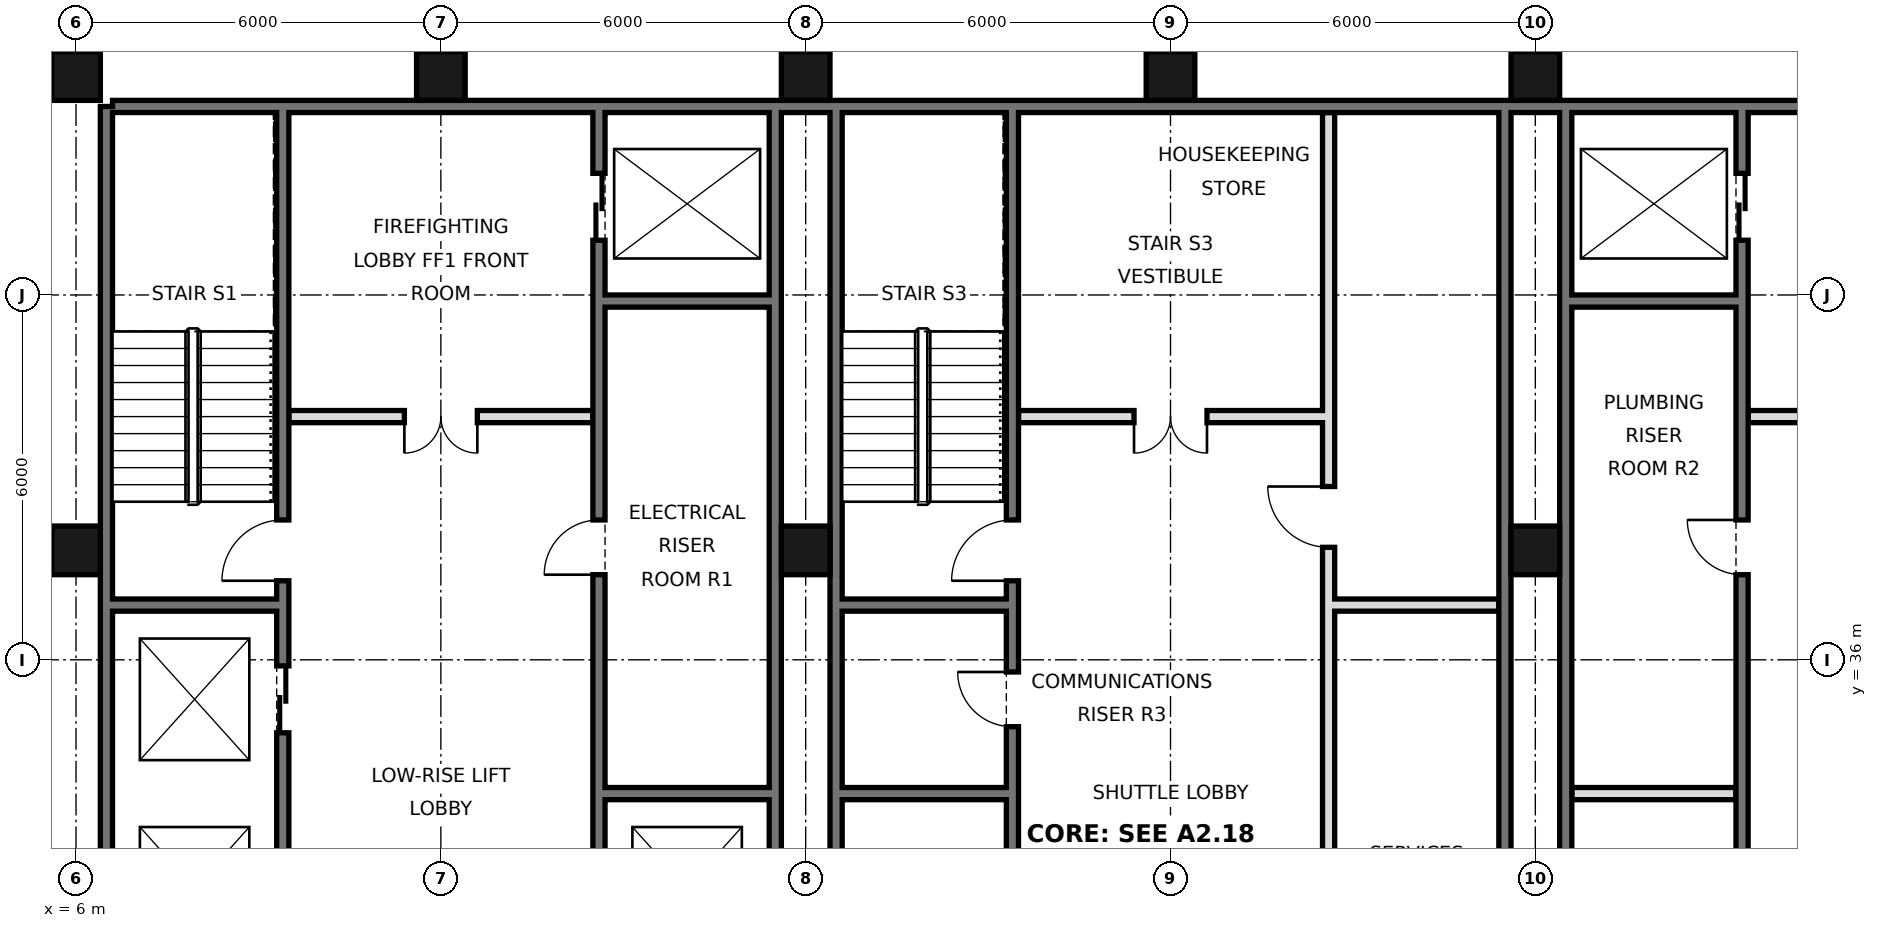
"""IFC4 building model, lengths in metres.
Left out: names, types, materials, properties, quantities, classifications, styles, units other than length and angle.
Written with IfcOpenShell. Run it as: python <this file> out.ifc"""

import sys

from ifc_helpers import new_model, si_unit, direction, frame, frame_2d, origin, origin_2d, place, context, subcontext, project, spatial, rectangle, hollow_rectangle, extrude, element, fill, save


model = new_model("IFC4")
c1 = context("Model", 3, precision=1e-05, world=origin(), true_north=direction((0.0, 1.0)))
c2 = subcontext(c1, "Body", "Model", "MODEL_VIEW")
j1 = project(units=[si_unit("LENGTHUNIT", "METRE"), si_unit("PLANEANGLEUNIT", "RADIAN")], contexts=[c1])
p1 = place(None, origin())
s1 = spatial("IfcSite", under=j1, at=p1, CompositionType="ELEMENT")
p2 = place(p1, origin())
s2 = spatial("IfcBuilding", under=s1, at=p2, CompositionType="ELEMENT")
p3 = place(p2, frame((0.0, 0.0, 71.4)))
s3 = spatial("IfcBuildingStorey", under=s2, at=p3, CompositionType="ELEMENT", Elevation=71.4)
for number, where, z_axis, x_axis in (
    (1, (6.0, 37.8, 0.0), (0.0, 0.0, 1.0), (1.0, 0.0, 0.0)),
    (2, (6.0, 45.6, 0.0), (0.0, 0.0, 1.0), (1.0, 0.0, 0.0)),
    (3, (12.0, 45.6, 0.0), (0.0, 0.0, 1.0), (1.0, 0.0, 0.0)),
    (4, (18.0, 37.8, 0.0), (0.0, 0.0, 1.0), (1.0, 0.0, 0.0)),
    (5, (18.0, 45.6, 0.0), (0.0, 0.0, 1.0), (1.0, 0.0, 0.0)),
    (6, (24.0, 45.6, 0.0), (0.0, 0.0, 1.0), (1.0, 0.0, 0.0)),
    (7, (30.0, 37.8, 0.0), (0.0, 0.0, 1.0), (1.0, 0.0, 0.0)),
    (8, (30.0, 45.6, 0.0), (0.0, 0.0, 1.0), (1.0, 0.0, 0.0)),
):
    element("IfcColumn", number, at=place(p3, frame(where, z_axis=z_axis, x_axis=x_axis)), inside=s3, PredefinedType="COLUMN", context=c2, shape_type="SweptSolid", body=[
        extrude(hollow_rectangle(XDim=0.8, YDim=0.8, WallThickness=0.06, at=origin_2d()), origin(), (0.0, 0.0, 1.0), 3.6),
    ])
p4 = place(p3, frame((6.5, 21.6, 0.0), z_axis=(0.0, 0.0, 1.0), x_axis=(0.0, 1.0, 0.0)))
e9 = element("IfcWall", 9, at=p4, inside=s3, PredefinedType="SOLIDWALL", context=c2, shape_type="SweptSolid", body=[
    extrude(rectangle(XDim=23.5, YDim=0.2, at=frame_2d((11.75, 0.0))), origin(), (0.0, 0.0, 1.0), 3.42),
])
p5 = place(p3, frame((6.6, 45.1, 0.0), z_axis=(0.0, 0.0, 1.0), x_axis=(1.0, 0.0, 0.0)))
e10 = element("IfcWall", 10, at=p5, inside=s3, PredefinedType="SOLIDWALL", context=c2, shape_type="SweptSolid", body=[
    extrude(rectangle(XDim=34.8, YDim=0.2, at=frame_2d((17.4, 0.0))), origin(), (0.0, 0.0, 1.0), 3.42),
])
for number, where, z_axis, x_axis in (
    (11, (17.5, 27.6, 0.0), (0.0, 0.0, 1.0), (0.0, 1.0, 0.0)),
    (12, (18.5, 27.6, 0.0), (0.0, 0.0, 1.0), (0.0, 1.0, 0.0)),
    (13, (29.5, 27.6, 0.0), (0.0, 0.0, 1.0), (0.0, 1.0, 0.0)),
    (14, (30.5, 27.6, 0.0), (0.0, 0.0, 1.0), (0.0, 1.0, 0.0)),
):
    element("IfcWall", number, at=place(p3, frame(where, z_axis=z_axis, x_axis=x_axis)), inside=s3, PredefinedType="SOLIDWALL", context=c2, shape_type="SweptSolid", body=[
        extrude(rectangle(XDim=17.5, YDim=0.2, at=frame_2d((8.75, 0.0))), origin(), (0.0, 0.0, 1.0), 3.42),
    ])
p6 = place(p3, frame((14.6, 27.5, 0.0), z_axis=(0.0, 0.0, 1.0), x_axis=(0.0, 1.0, 0.0)))
e15 = element("IfcWall", 15, at=p6, inside=s3, PredefinedType="SOLIDWALL", context=c2, shape_type="SweptSolid", body=[
    extrude(rectangle(XDim=17.5, YDim=0.2, at=frame_2d((8.75, 0.0))), origin(), (0.0, 0.0, 1.0), 3.42),
])
p7 = place(p6, frame((1.1, 0.0, 0.0)))
e16 = element("IfcOpeningElement", 16, at=p7, cuts=e15, PredefinedType="OPENING", context=c2, shape_type="SweptSolid", body=[
    extrude(rectangle(XDim=1.1, YDim=2.1, at=frame_2d((0.55, 1.05))), frame((0.0, 0.11, 0.0), z_axis=(0.0, -1.0, 0.0), x_axis=(1.0, 0.0, 0.0)), (0.0, 0.0, 1.0), 0.22),
])
p8 = place(p6, frame((4.2, 0.0, 0.0)))
e17 = element("IfcOpeningElement", 17, at=p8, cuts=e15, PredefinedType="OPENING", context=c2, shape_type="SweptSolid", body=[
    extrude(rectangle(XDim=1.1, YDim=2.1, at=frame_2d((0.55, 1.05))), frame((0.0, 0.11, 0.0), z_axis=(0.0, -1.0, 0.0), x_axis=(1.0, 0.0, 0.0)), (0.0, 0.0, 1.0), 0.22),
])
p9 = place(p6, frame((15.4, 0.0, 0.0)))
e18 = element("IfcOpeningElement", 18, at=p9, cuts=e15, PredefinedType="OPENING", context=c2, shape_type="SweptSolid", body=[
    extrude(rectangle(XDim=1.1, YDim=2.1, at=frame_2d((0.55, 1.05))), frame((0.0, 0.11, 0.0), z_axis=(0.0, -1.0, 0.0), x_axis=(1.0, 0.0, 0.0)), (0.0, 0.0, 1.0), 0.22),
])
p10 = place(p6, frame((9.9, 0.0, 0.0)))
e19 = element("IfcOpeningElement", 19, at=p10, cuts=e15, PredefinedType="OPENING", context=c2, shape_type="SweptSolid", body=[
    extrude(rectangle(XDim=0.9, YDim=2.1, at=frame_2d((0.45, 1.05))), frame((0.0, 0.11, 0.0), z_axis=(0.0, -1.0, 0.0), x_axis=(1.0, 0.0, 0.0)), (0.0, 0.0, 1.0), 0.22),
])
p11 = place(p3, frame((21.4, 27.5, 0.0), z_axis=(0.0, 0.0, 1.0), x_axis=(0.0, 1.0, 0.0)))
e20 = element("IfcWall", 20, at=p11, inside=s3, PredefinedType="SOLIDWALL", context=c2, shape_type="SweptSolid", body=[
    extrude(rectangle(XDim=17.5, YDim=0.2, at=frame_2d((8.75, 0.0))), origin(), (0.0, 0.0, 1.0), 3.42),
])
p12 = place(p11, frame((9.8, 0.0, 0.0)))
e21 = element("IfcOpeningElement", 21, at=p12, cuts=e20, PredefinedType="OPENING", context=c2, shape_type="SweptSolid", body=[
    extrude(rectangle(XDim=1.0, YDim=2.1, at=frame_2d((0.5, 1.05))), frame((0.0, 0.11, 0.0), z_axis=(0.0, -1.0, 0.0), x_axis=(1.0, 0.0, 0.0)), (0.0, 0.0, 1.0), 0.22),
])
p13 = place(p11, frame((7.4, 0.0, 0.0)))
e22 = element("IfcOpeningElement", 22, at=p13, cuts=e20, PredefinedType="OPENING", context=c2, shape_type="SweptSolid", body=[
    extrude(rectangle(XDim=0.9, YDim=2.1, at=frame_2d((0.45, 1.05))), frame((0.0, 0.11, 0.0), z_axis=(0.0, -1.0, 0.0), x_axis=(1.0, 0.0, 0.0)), (0.0, 0.0, 1.0), 0.22),
])
p14 = place(p3, frame((26.6, 27.5, 0.0), z_axis=(0.0, 0.0, 1.0), x_axis=(0.0, 1.0, 0.0)))
e23 = element("IfcWall", 23, at=p14, inside=s3, PredefinedType="SOLIDWALL", context=c2, shape_type="SweptSolid", body=[
    extrude(rectangle(XDim=17.5, YDim=0.2, at=frame_2d((8.75, 0.0))), origin(), (0.0, 0.0, 1.0), 3.42),
])
p15 = place(p14, frame((4.3, 0.0, 0.0)))
e24 = element("IfcOpeningElement", 24, at=p15, cuts=e23, PredefinedType="OPENING", context=c2, shape_type="SweptSolid", body=[
    extrude(rectangle(XDim=0.9, YDim=2.1, at=frame_2d((0.45, 1.05))), frame((0.0, 0.11, 0.0), z_axis=(0.0, -1.0, 0.0), x_axis=(1.0, 0.0, 0.0)), (0.0, 0.0, 1.0), 0.22),
])
p16 = place(p14, frame((10.35, 0.0, 0.0)))
e25 = element("IfcOpeningElement", 25, at=p16, cuts=e23, PredefinedType="OPENING", context=c2, shape_type="SweptSolid", body=[
    extrude(rectangle(XDim=1.0, YDim=2.1, at=frame_2d((0.5, 1.05))), frame((0.0, 0.11, 0.0), z_axis=(0.0, -1.0, 0.0), x_axis=(1.0, 0.0, 0.0)), (0.0, 0.0, 1.0), 0.22),
])
p17 = place(p3, frame((33.4, 27.5, 0.0), z_axis=(0.0, 0.0, 1.0), x_axis=(0.0, 1.0, 0.0)))
e26 = element("IfcWall", 26, at=p17, inside=s3, PredefinedType="SOLIDWALL", context=c2, shape_type="SweptSolid", body=[
    extrude(rectangle(XDim=17.5, YDim=0.2, at=frame_2d((8.75, 0.0))), origin(), (0.0, 0.0, 1.0), 3.42),
])
p18 = place(p17, frame((15.4, 0.0, 0.0)))
e27 = element("IfcOpeningElement", 27, at=p18, cuts=e26, PredefinedType="OPENING", context=c2, shape_type="SweptSolid", body=[
    extrude(rectangle(XDim=1.1, YDim=2.1, at=frame_2d((0.55, 1.05))), frame((0.0, 0.11, 0.0), z_axis=(0.0, -1.0, 0.0), x_axis=(1.0, 0.0, 0.0)), (0.0, 0.0, 1.0), 0.22),
])
p19 = place(p17, frame((2.7, 0.0, 0.0)))
e28 = element("IfcOpeningElement", 28, at=p19, cuts=e26, PredefinedType="OPENING", context=c2, shape_type="SweptSolid", body=[
    extrude(rectangle(XDim=1.0, YDim=2.1, at=frame_2d((0.5, 1.05))), frame((0.0, 0.11, 0.0), z_axis=(0.0, -1.0, 0.0), x_axis=(1.0, 0.0, 0.0)), (0.0, 0.0, 1.0), 0.22),
])
p20 = place(p17, frame((9.9, 0.0, 0.0)))
e29 = element("IfcOpeningElement", 29, at=p20, cuts=e26, PredefinedType="OPENING", context=c2, shape_type="SweptSolid", body=[
    extrude(rectangle(XDim=0.9, YDim=2.1, at=frame_2d((0.45, 1.05))), frame((0.0, 0.11, 0.0), z_axis=(0.0, -1.0, 0.0), x_axis=(1.0, 0.0, 0.0)), (0.0, 0.0, 1.0), 0.22),
])
p21 = place(p3, frame((9.4, 21.6, 0.0), z_axis=(0.0, 0.0, 1.0), x_axis=(0.0, 1.0, 0.0)))
e30 = element("IfcWall", 30, at=p21, inside=s3, PredefinedType="SOLIDWALL", context=c2, shape_type="SweptSolid", body=[
    extrude(rectangle(XDim=23.4, YDim=0.2, at=frame_2d((11.7, 0.0))), origin(), (0.0, 0.0, 1.0), 3.42),
])
p22 = place(p21, frame((7.0, 0.0, 0.0)))
e31 = element("IfcOpeningElement", 31, at=p22, cuts=e30, PredefinedType="OPENING", context=c2, shape_type="SweptSolid", body=[
    extrude(rectangle(XDim=1.1, YDim=2.1, at=frame_2d((0.55, 1.05))), frame((0.0, 0.11, 0.0), z_axis=(0.0, -1.0, 0.0), x_axis=(1.0, 0.0, 0.0)), (0.0, 0.0, 1.0), 0.22),
])
p23 = place(p21, frame((10.1, 0.0, 0.0)))
e32 = element("IfcOpeningElement", 32, at=p23, cuts=e30, PredefinedType="OPENING", context=c2, shape_type="SweptSolid", body=[
    extrude(rectangle(XDim=1.1, YDim=2.1, at=frame_2d((0.55, 1.05))), frame((0.0, 0.11, 0.0), z_axis=(0.0, -1.0, 0.0), x_axis=(1.0, 0.0, 0.0)), (0.0, 0.0, 1.0), 0.22),
])
p24 = place(p21, frame((13.2, 0.0, 0.0)))
e33 = element("IfcOpeningElement", 33, at=p24, cuts=e30, PredefinedType="OPENING", context=c2, shape_type="SweptSolid", body=[
    extrude(rectangle(XDim=1.1, YDim=2.1, at=frame_2d((0.55, 1.05))), frame((0.0, 0.11, 0.0), z_axis=(0.0, -1.0, 0.0), x_axis=(1.0, 0.0, 0.0)), (0.0, 0.0, 1.0), 0.22),
])
p25 = place(p21, frame((15.7, 0.0, 0.0)))
e34 = element("IfcOpeningElement", 34, at=p25, cuts=e30, PredefinedType="OPENING", context=c2, shape_type="SweptSolid", body=[
    extrude(rectangle(XDim=1.0, YDim=2.1, at=frame_2d((0.5, 1.05))), frame((0.0, 0.11, 0.0), z_axis=(0.0, -1.0, 0.0), x_axis=(1.0, 0.0, 0.0)), (0.0, 0.0, 1.0), 0.22),
])
p26 = place(p21, frame((0.175, 0.0, 0.0)))
e35 = element("IfcOpeningElement", 35, at=p26, cuts=e30, PredefinedType="OPENING", context=c2, shape_type="SweptSolid", body=[
    extrude(rectangle(XDim=0.9, YDim=2.1, at=frame_2d((0.45, 1.05))), frame((0.0, 0.11, 0.0), z_axis=(0.0, -1.0, 0.0), x_axis=(1.0, 0.0, 0.0)), (0.0, 0.0, 1.0), 0.22),
])
for number, where, z_axis, x_axis in (
    (36, (14.7, 33.8, 0.0), (0.0, 0.0, 1.0), (1.0, 0.0, 0.0)),
    (37, (18.6, 33.8, 0.0), (0.0, 0.0, 1.0), (1.0, 0.0, 0.0)),
    (38, (30.6, 33.8, 0.0), (0.0, 0.0, 1.0), (1.0, 0.0, 0.0)),
    (39, (18.6, 36.9, 0.0), (0.0, 0.0, 1.0), (1.0, 0.0, 0.0)),
    (40, (26.7, 36.9, 0.0), (0.0, 0.0, 1.0), (1.0, 0.0, 0.0)),
    (41, (6.6, 36.9, 0.0), (0.0, 0.0, 1.0), (1.0, 0.0, 0.0)),
):
    element("IfcWall", number, at=place(p3, frame(where, z_axis=z_axis, x_axis=x_axis)), inside=s3, PredefinedType="SOLIDWALL", context=c2, shape_type="SweptSolid", body=[
        extrude(rectangle(XDim=2.7, YDim=0.2, at=frame_2d((1.35, 0.0))), origin(), (0.0, 0.0, 1.0), 3.42),
    ])
p27 = place(p3, frame((21.5, 40.0, 0.0), z_axis=(0.0, 0.0, 1.0), x_axis=(1.0, 0.0, 0.0)))
e42 = element("IfcWall", 42, at=p27, inside=s3, PredefinedType="PARTITIONING", context=c2, shape_type="SweptSolid", body=[
    extrude(rectangle(XDim=5.0, YDim=0.2, at=frame_2d((2.5, 0.0))), origin(), (0.0, 0.0, 1.0), 3.42),
])
p28 = place(p27, frame((1.9, 0.0, 0.0)))
e43 = element("IfcOpeningElement", 43, at=p28, cuts=e42, PredefinedType="OPENING", context=c2, shape_type="SweptSolid", body=[
    extrude(rectangle(XDim=1.2, YDim=2.1, at=frame_2d((0.6, 1.05))), frame((0.0, 0.11, 0.0), z_axis=(0.0, -1.0, 0.0), x_axis=(1.0, 0.0, 0.0)), (0.0, 0.0, 1.0), 0.22),
])
p29 = place(p3, frame((33.5, 40.0, 0.0), z_axis=(0.0, 0.0, 1.0), x_axis=(1.0, 0.0, 0.0)))
e44 = element("IfcWall", 44, at=p29, inside=s3, PredefinedType="PARTITIONING", context=c2, shape_type="SweptSolid", body=[
    extrude(rectangle(XDim=5.0, YDim=0.2, at=frame_2d((2.5, 0.0))), origin(), (0.0, 0.0, 1.0), 3.42),
])
p30 = place(p29, frame((1.9, 0.0, 0.0)))
e45 = element("IfcOpeningElement", 45, at=p30, cuts=e44, PredefinedType="OPENING", context=c2, shape_type="SweptSolid", body=[
    extrude(rectangle(XDim=1.2, YDim=2.1, at=frame_2d((0.6, 1.05))), frame((0.0, 0.11, 0.0), z_axis=(0.0, -1.0, 0.0), x_axis=(1.0, 0.0, 0.0)), (0.0, 0.0, 1.0), 0.22),
])
p31 = place(p3, frame((9.5, 40.0, 0.0), z_axis=(0.0, 0.0, 1.0), x_axis=(1.0, 0.0, 0.0)))
e46 = element("IfcWall", 46, at=p31, inside=s3, PredefinedType="PARTITIONING", context=c2, shape_type="SweptSolid", body=[
    extrude(rectangle(XDim=5.0, YDim=0.2, at=frame_2d((2.5, 0.0))), origin(), (0.0, 0.0, 1.0), 3.42),
])
p32 = place(p31, frame((1.9, 0.0, 0.0)))
e47 = element("IfcOpeningElement", 47, at=p32, cuts=e46, PredefinedType="OPENING", context=c2, shape_type="SweptSolid", body=[
    extrude(rectangle(XDim=1.2, YDim=2.1, at=frame_2d((0.6, 1.05))), frame((0.0, 0.11, 0.0), z_axis=(0.0, -1.0, 0.0), x_axis=(1.0, 0.0, 0.0)), (0.0, 0.0, 1.0), 0.22),
])
for number, where, z_axis, x_axis in (
    (48, (14.7, 41.9, 0.0), (0.0, 0.0, 1.0), (1.0, 0.0, 0.0)),
    (49, (30.6, 41.9, 0.0), (0.0, 0.0, 1.0), (1.0, 0.0, 0.0)),
):
    element("IfcWall", number, at=place(p3, frame(where, z_axis=z_axis, x_axis=x_axis)), inside=s3, PredefinedType="SOLIDWALL", context=c2, shape_type="SweptSolid", body=[
        extrude(rectangle(XDim=2.7, YDim=0.2, at=frame_2d((1.35, 0.0))), origin(), (0.0, 0.0, 1.0), 3.42),
    ])
p33 = place(p32, frame((1.2, 0.0, 0.0), z_axis=(0.0, 0.0, 1.0), x_axis=(-1.0, 0.0, 0.0)))
e50 = element("IfcDoor", 50, at=p33, inside=s3, OperationType="DOUBLE_DOOR_SINGLE_SWING", PredefinedType="DOOR", context=c2, shape_type="SweptSolid", body=[
    extrude(rectangle(XDim=1.2, YDim=2.1, at=frame_2d((0.6, 1.05))), frame((0.0, 0.025, 0.0), z_axis=(0.0, -1.0, 0.0), x_axis=(1.0, 0.0, 0.0)), (0.0, 0.0, 1.0), 0.05),
])
fill(e47, e50)
p34 = place(p28, frame((1.2, 0.0, 0.0), z_axis=(0.0, 0.0, 1.0), x_axis=(-1.0, 0.0, 0.0)))
e51 = element("IfcDoor", 51, at=p34, inside=s3, OperationType="DOUBLE_DOOR_SINGLE_SWING", PredefinedType="DOOR", context=c2, shape_type="SweptSolid", body=[
    extrude(rectangle(XDim=1.2, YDim=2.1, at=frame_2d((0.6, 1.05))), frame((0.0, 0.025, 0.0), z_axis=(0.0, -1.0, 0.0), x_axis=(1.0, 0.0, 0.0)), (0.0, 0.0, 1.0), 0.05),
])
fill(e43, e51)
p35 = place(p18, origin())
e52 = element("IfcDoor", 52, at=p35, inside=s3, OperationType="DOUBLE_DOOR_SLIDING", PredefinedType="DOOR", context=c2, shape_type="SweptSolid", body=[
    extrude(rectangle(XDim=1.1, YDim=2.1, at=frame_2d((0.55, 1.05))), frame((0.0, 0.025, 0.0), z_axis=(0.0, -1.0, 0.0), x_axis=(1.0, 0.0, 0.0)), (0.0, 0.0, 1.0), 0.05),
])
fill(e27, e52)
p36 = place(p9, origin())
e53 = element("IfcDoor", 53, at=p36, inside=s3, OperationType="DOUBLE_DOOR_SLIDING", PredefinedType="DOOR", context=c2, shape_type="SweptSolid", body=[
    extrude(rectangle(XDim=1.1, YDim=2.1, at=frame_2d((0.55, 1.05))), frame((0.0, 0.025, 0.0), z_axis=(0.0, -1.0, 0.0), x_axis=(1.0, 0.0, 0.0)), (0.0, 0.0, 1.0), 0.05),
])
fill(e18, e53)
p37 = place(p24, origin())
e54 = element("IfcDoor", 54, at=p37, inside=s3, OperationType="DOUBLE_DOOR_SLIDING", PredefinedType="DOOR", context=c2, shape_type="SweptSolid", body=[
    extrude(rectangle(XDim=1.1, YDim=2.1, at=frame_2d((0.55, 1.05))), frame((0.0, 0.025, 0.0), z_axis=(0.0, -1.0, 0.0), x_axis=(1.0, 0.0, 0.0)), (0.0, 0.0, 1.0), 0.05),
])
fill(e33, e54)
p38 = place(p25, origin())
e55 = element("IfcDoor", 55, at=p38, inside=s3, OperationType="SINGLE_SWING_LEFT", PredefinedType="DOOR", context=c2, shape_type="SweptSolid", body=[
    extrude(rectangle(XDim=1.0, YDim=2.1, at=frame_2d((0.5, 1.05))), frame((0.0, 0.025, 0.0), z_axis=(0.0, -1.0, 0.0), x_axis=(1.0, 0.0, 0.0)), (0.0, 0.0, 1.0), 0.05),
])
fill(e34, e55)
p39 = place(p12, origin())
e56 = element("IfcDoor", 56, at=p39, inside=s3, OperationType="SINGLE_SWING_LEFT", PredefinedType="DOOR", context=c2, shape_type="SweptSolid", body=[
    extrude(rectangle(XDim=1.0, YDim=2.1, at=frame_2d((0.5, 1.05))), frame((0.0, 0.025, 0.0), z_axis=(0.0, -1.0, 0.0), x_axis=(1.0, 0.0, 0.0)), (0.0, 0.0, 1.0), 0.05),
])
fill(e21, e56)
p40 = place(p10, origin())
e57 = element("IfcDoor", 57, at=p40, inside=s3, OperationType="SINGLE_SWING_LEFT", PredefinedType="DOOR", context=c2, shape_type="SweptSolid", body=[
    extrude(rectangle(XDim=0.9, YDim=2.1, at=frame_2d((0.45, 1.05))), frame((0.0, 0.025, 0.0), z_axis=(0.0, -1.0, 0.0), x_axis=(1.0, 0.0, 0.0)), (0.0, 0.0, 1.0), 0.05),
])
fill(e19, e57)
p41 = place(p20, frame((0.9, 0.0, 0.0), z_axis=(0.0, 0.0, 1.0), x_axis=(-1.0, 0.0, 0.0)))
e58 = element("IfcDoor", 58, at=p41, inside=s3, OperationType="SINGLE_SWING_LEFT", PredefinedType="DOOR", context=c2, shape_type="SweptSolid", body=[
    extrude(rectangle(XDim=0.9, YDim=2.1, at=frame_2d((0.45, 1.05))), frame((0.0, 0.025, 0.0), z_axis=(0.0, -1.0, 0.0), x_axis=(1.0, 0.0, 0.0)), (0.0, 0.0, 1.0), 0.05),
])
fill(e29, e58)
p42 = place(p13, frame((0.9, 0.0, 0.0), z_axis=(0.0, 0.0, 1.0), x_axis=(-1.0, 0.0, 0.0)))
e59 = element("IfcDoor", 59, at=p42, inside=s3, OperationType="SINGLE_SWING_LEFT", PredefinedType="DOOR", context=c2, shape_type="SweptSolid", body=[
    extrude(rectangle(XDim=0.9, YDim=2.1, at=frame_2d((0.45, 1.05))), frame((0.0, 0.025, 0.0), z_axis=(0.0, -1.0, 0.0), x_axis=(1.0, 0.0, 0.0)), (0.0, 0.0, 1.0), 0.05),
])
fill(e22, e59)
p43 = place(p16, frame((1.0, 0.0, 0.0), z_axis=(0.0, 0.0, 1.0), x_axis=(-1.0, 0.0, 0.0)))
e60 = element("IfcDoor", 60, at=p43, inside=s3, OperationType="SINGLE_SWING_LEFT", PredefinedType="DOOR", context=c2, shape_type="SweptSolid", body=[
    extrude(rectangle(XDim=1.0, YDim=2.1, at=frame_2d((0.5, 1.05))), frame((0.0, 0.025, 0.0), z_axis=(0.0, -1.0, 0.0), x_axis=(1.0, 0.0, 0.0)), (0.0, 0.0, 1.0), 0.05),
])
fill(e25, e60)
save(model, sys.argv[1])
